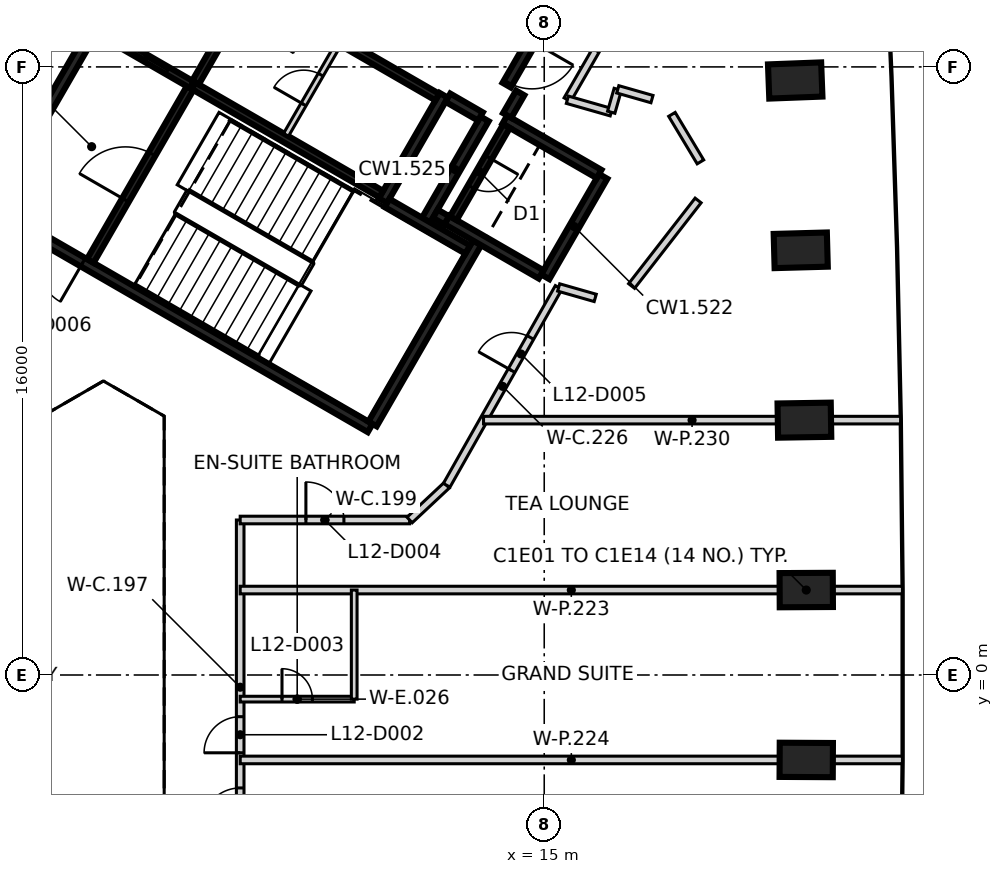
"""IFC4 building model, lengths in metres.
Left out: names, types, materials, properties, quantities, classifications, styles, units other than length and angle.
Written with IfcOpenShell. Run it as: python <this file> out.ifc"""

import sys

from ifc_helpers import new_model, si_unit, direction, frame, frame_2d, origin, origin_2d, place, context, subcontext, project, spatial, rectangle, extrude, element, fill, save


model = new_model("IFC4")
c1 = context("Model", 3, precision=1e-05, world=origin(), true_north=direction((0.0, 1.0)))
c2 = subcontext(c1, "Body", "Model", "MODEL_VIEW")
j1 = project(units=[si_unit("LENGTHUNIT", "METRE"), si_unit("PLANEANGLEUNIT", "RADIAN")], contexts=[c1])
p1 = place(None, origin())
s1 = spatial("IfcSite", under=j1, at=p1, CompositionType="ELEMENT")
p2 = place(p1, origin())
s2 = spatial("IfcBuilding", under=s1, at=p2, CompositionType="ELEMENT")
p3 = place(p2, frame((0.0, 0.0, 56.6)))
s3 = spatial("IfcBuildingStorey", under=s2, at=p3, CompositionType="ELEMENT", Elevation=56.6)
for number, where, z_axis, x_axis in (
    (1, (21.894, -2.235, -0.475), (0.0, 0.0, 1.0), (-1.0, 0.005, 0.0)),
    (2, (21.894, 2.235, -0.475), (0.0, 0.0, 1.0), (1.0, 0.005, 0.0)),
    (3, (21.846, 6.706, -0.475), (0.0, 0.0, 1.0), (1.0, 0.016, 0.0)),
    (4, (21.749, 11.174, -0.475), (0.0, 0.0, 1.0), (1.0, 0.027, 0.0)),
    (5, (21.604, 15.643, -0.475), (0.0, 0.0, 1.0), (0.999, 0.038, 0.0)),
):
    element("IfcColumn", number, at=place(p3, frame(where, z_axis=z_axis, x_axis=x_axis)), inside=s3, PredefinedType="COLUMN", context=c2, shape_type="SweptSolid", body=[
        extrude(rectangle(XDim=1.4, YDim=0.9, at=origin_2d()), origin(), (0.0, 0.0, 1.0), 3.6),
    ])
p4 = place(p3, frame((10.42, 6.498, 0.0), z_axis=(0.0, 0.0, 1.0), x_axis=(-0.866021906294, 0.500006057782, 0.0)))
e6 = element("IfcWall", 6, at=p4, inside=s3, PredefinedType="SHEAR", context=c2, shape_type="SweptSolid", body=[
    extrude(rectangle(XDim=11.55, YDim=0.25, at=frame_2d((5.775, 0.0))), origin(), (0.0, 0.0, 1.0), 3.125),
])
p5 = place(p4, frame((10.025, 0.0, 0.0)))
e7 = element("IfcOpeningElement", 7, at=p5, cuts=e6, PredefinedType="OPENING", context=c2, shape_type="SweptSolid", body=[
    extrude(rectangle(XDim=1.2, YDim=2.1, at=frame_2d((0.6, 1.05))), frame((0.0, 0.135, 0.0), z_axis=(0.0, -1.0, 0.0), x_axis=(1.0, 0.0, 0.0)), (0.0, 0.0, 1.0), 0.27),
])
p6 = place(p4, frame((8.725, 0.0, 0.0)))
e8 = element("IfcOpeningElement", 8, at=p6, cuts=e6, PredefinedType="OPENING", context=c2, shape_type="SweptSolid", body=[
    extrude(rectangle(XDim=1.2, YDim=2.1, at=frame_2d((0.6, 1.05))), frame((0.0, 0.135, 0.0), z_axis=(0.0, -1.0, 0.0), x_axis=(1.0, 0.0, 0.0)), (0.0, 0.0, 1.0), 0.27),
])
p7 = place(p3, frame((0.48, 12.381, 0.0), z_axis=(0.0, 0.0, 1.0), x_axis=(0.49999885962, 0.866026062182, 0.0)))
e9 = element("IfcWall", 9, at=p7, inside=s3, PredefinedType="SHEAR", context=c2, shape_type="SweptSolid", body=[
    extrude(rectangle(XDim=5.225, YDim=0.25, at=frame_2d((2.612, 0.0))), origin(), (0.0, 0.0, 1.0), 3.125),
])
p8 = place(p3, frame((13.238, 11.378, 0.0), z_axis=(0.0, 0.0, 1.0), x_axis=(-0.500008851346, -0.866020293397, 0.0)))
e10 = element("IfcWall", 10, at=p8, inside=s3, PredefinedType="SHEAR", context=c2, shape_type="SweptSolid", body=[
    extrude(rectangle(XDim=5.51, YDim=0.25, at=frame_2d((2.755, 0.0))), origin(), (0.0, 0.0, 1.0), 3.125),
])
p9 = place(p3, frame((12.357, 15.252, 0.0), z_axis=(0.0, 0.0, 1.0), x_axis=(-0.500028443584, -0.866008981251, 0.0)))
e11 = element("IfcWall", 11, at=p9, inside=s3, PredefinedType="SHEAR", context=c2, shape_type="SweptSolid", body=[
    extrude(rectangle(XDim=3.2, YDim=0.25, at=frame_2d((1.6, 0.0))), origin(), (0.0, 0.0, 1.0), 3.125),
])
p10 = place(p3, frame((16.552, 13.119, 0.0), z_axis=(0.0, 0.0, 1.0), x_axis=(-0.499978833458, -0.866037623948, 0.0)))
e12 = element("IfcWall", 12, at=p10, inside=s3, PredefinedType="SHEAR", context=c2, shape_type="SweptSolid", body=[
    extrude(rectangle(XDim=3.05, YDim=0.25, at=frame_2d((1.525, 0.0))), origin(), (0.0, 0.0, 1.0), 3.125),
])
p11 = place(p3, frame((14.918, 10.54, 0.0), z_axis=(0.0, 0.0, 1.0), x_axis=(-0.866063538972, 0.499933942099, 0.0)))
e13 = element("IfcWall", 13, at=p11, inside=s3, PredefinedType="SHEAR", context=c2, shape_type="SweptSolid", body=[
    extrude(rectangle(XDim=2.865, YDim=0.25, at=frame_2d((1.432, 0.0))), origin(), (0.0, 0.0, 1.0), 3.125),
])
p12 = place(p3, frame((13.963, 14.614, 0.0), z_axis=(0.0, 0.0, 1.0), x_axis=(0.866042235819, -0.499970844928, 0.0)))
e14 = element("IfcWall", 14, at=p12, inside=s3, PredefinedType="SHEAR", context=c2, shape_type="SweptSolid", body=[
    extrude(rectangle(XDim=2.865, YDim=0.25, at=frame_2d((1.432, 0.0))), origin(), (0.0, 0.0, 1.0), 3.125),
])
p13 = place(p3, frame((11.888, 11.961, 0.0), z_axis=(0.0, 0.0, 1.0), x_axis=(0.500003324108, 0.866023484601, 0.0)))
e15 = element("IfcWall", 15, at=p13, inside=s3, PredefinedType="SHEAR", context=c2, shape_type="SweptSolid", body=[
    extrude(rectangle(XDim=3.085, YDim=0.25, at=frame_2d((1.542, 0.0))), origin(), (0.0, 0.0, 1.0), 3.125),
])
p14 = place(p3, frame((10.865, 12.418, 0.0), z_axis=(0.0, 0.0, 1.0), x_axis=(0.866026229868, -0.499998569178, 0.0)))
e16 = element("IfcWall", 16, at=p14, inside=s3, PredefinedType="SHEAR", context=c2, shape_type="SweptSolid", body=[
    extrude(rectangle(XDim=2.449, YDim=0.25, at=frame_2d((1.225, 0.0))), origin(), (0.0, 0.0, 1.0), 3.125),
])
p15 = place(p3, frame((14.945, 17.135, 0.0), z_axis=(0.0, 0.0, 1.0), x_axis=(-0.499983108224, -0.866035156036, 0.0)))
e17 = element("IfcWall", 17, at=p15, inside=s3, PredefinedType="SHEAR", context=c2, shape_type="SweptSolid", body=[
    extrude(rectangle(XDim=1.865, YDim=0.25, at=frame_2d((0.932, 0.0))), origin(), (0.0, 0.0, 1.0), 3.125),
])
p16 = place(p15, frame((0.535, 0.0, 0.0)))
e18 = element("IfcOpeningElement", 18, at=p16, cuts=e17, PredefinedType="OPENING", context=c2, shape_type="SweptSolid", body=[
    extrude(rectangle(XDim=1.25, YDim=2.1, at=frame_2d((0.625, 1.05))), frame((0.0, 0.135, 0.0), z_axis=(0.0, -1.0, 0.0), x_axis=(1.0, 0.0, 0.0)), (0.0, 0.0, 1.0), 0.27),
])
p17 = place(p3, frame((13.322, 14.695, 0.0), z_axis=(0.0, 0.0, 1.0), x_axis=(-0.866017078145, 0.500014420154, 0.0)))
e19 = element("IfcWall", 19, at=p17, inside=s3, PredefinedType="SHEAR", context=c2, shape_type="SweptSolid", body=[
    extrude(rectangle(XDim=0.989, YDim=0.25, at=frame_2d((0.495, 0.0))), origin(), (0.0, 0.0, 1.0), 3.125),
])
p18 = place(p3, frame((14.368, 15.315, 0.0), z_axis=(0.0, 0.0, 1.0), x_axis=(-0.499897359611, -0.866084655132, 0.0)))
e20 = element("IfcWall", 20, at=p18, inside=s3, PredefinedType="SHEAR", context=c2, shape_type="SweptSolid", body=[
    extrude(rectangle(XDim=0.685, YDim=0.25, at=frame_2d((0.342, 0.0))), origin(), (0.0, 0.0, 1.0), 3.125),
])
p19 = place(p3, frame((12.433, 11.964, 0.0), z_axis=(0.0, 0.0, 1.0), x_axis=(-0.866055875208, 0.499947218231, 0.0)))
e21 = element("IfcWall", 21, at=p19, inside=s3, PredefinedType="SHEAR", context=c2, shape_type="SweptSolid", body=[
    extrude(rectangle(XDim=0.345, YDim=0.25, at=frame_2d((0.172, 0.0))), origin(), (0.0, 0.0, 1.0), 3.125),
])
p20 = place(p3, frame((5.775, 15.502, 0.0), z_axis=(0.0, 0.0, 1.0), x_axis=(0.866020080793, -0.500009219579, 0.0)))
e22 = element("IfcWall", 22, at=p20, inside=s3, PredefinedType="SHEAR", context=c2, shape_type="SweptSolid", body=[
    extrude(rectangle(XDim=5.699, YDim=0.2, at=frame_2d((2.85, 0.0))), origin(), (0.0, 0.0, 1.0), 3.125),
])
p21 = place(p3, frame((12.185, 15.207, 0.0), z_axis=(0.0, 0.0, 1.0), x_axis=(-0.866020080793, 0.500009219579, 0.0)))
e23 = element("IfcWall", 23, at=p21, inside=s3, PredefinedType="SHEAR", context=c2, shape_type="SweptSolid", body=[
    extrude(rectangle(XDim=5.699, YDim=0.2, at=frame_2d((2.85, 0.0))), origin(), (0.0, 0.0, 1.0), 3.125),
])
p22 = place(p21, frame((3.874, 0.0, 0.0)))
e24 = element("IfcOpeningElement", 24, at=p22, cuts=e23, PredefinedType="OPENING", context=c2, shape_type="SweptSolid", body=[
    extrude(rectangle(XDim=0.9, YDim=2.1, at=frame_2d((0.45, 1.05))), frame((0.0, 0.11, 0.0), z_axis=(0.0, -1.0, 0.0), x_axis=(1.0, 0.0, 0.0)), (0.0, 0.0, 1.0), 0.22),
])
p23 = place(p3, frame((3.057, 10.895, 0.0), z_axis=(0.0, 0.0, 1.0), x_axis=(0.499989418164, 0.866031513124, 0.0)))
e25 = element("IfcWall", 25, at=p23, inside=s3, PredefinedType="SHEAR", context=c2, shape_type="SweptSolid", body=[
    extrude(rectangle(XDim=5.251, YDim=0.2, at=frame_2d((2.625, 0.0))), origin(), (0.0, 0.0, 1.0), 3.125),
])
p24 = place(p23, frame((1.849, 0.0, 0.0)))
e26 = element("IfcOpeningElement", 26, at=p24, cuts=e25, PredefinedType="OPENING", context=c2, shape_type="SweptSolid", body=[
    extrude(rectangle(XDim=1.4, YDim=2.1, at=frame_2d((0.7, 1.05))), frame((0.0, 0.11, 0.0), z_axis=(0.0, -1.0, 0.0), x_axis=(1.0, 0.0, 0.0)), (0.0, 0.0, 1.0), 0.22),
])
p25 = place(p3, frame((14.008, 14.442, 0.0), z_axis=(0.0, 0.0, 1.0), x_axis=(-0.499986818241, -0.866033014143, 0.0)))
e27 = element("IfcWall", 27, at=p25, inside=s3, PredefinedType="SHEAR", context=c2, shape_type="SweptSolid", body=[
    extrude(rectangle(XDim=2.798, YDim=0.2, at=frame_2d((1.399, 0.0))), origin(), (0.0, 0.0, 1.0), 3.125),
])
p26 = place(p25, frame((0.949, 0.0, 0.0)))
e28 = element("IfcOpeningElement", 28, at=p26, cuts=e27, PredefinedType="OPENING", context=c2, shape_type="SweptSolid", body=[
    extrude(rectangle(XDim=0.9, YDim=2.1, at=frame_2d((0.45, 1.05))), frame((0.0, 0.11, 0.0), z_axis=(0.0, -1.0, 0.0), x_axis=(1.0, 0.0, 0.0)), (0.0, 0.0, 1.0), 0.22),
])
p27 = place(p3, frame((7.199, 17.97, 0.0), z_axis=(0.0, 0.0, 1.0), x_axis=(-0.499968400327, -0.866043647095, 0.0)))
e29 = element("IfcWall", 29, at=p27, inside=s3, PredefinedType="SHEAR", context=c2, shape_type="SweptSolid", body=[
    extrude(rectangle(XDim=2.75, YDim=0.2, at=frame_2d((1.375, 0.0))), origin(), (0.0, 0.0, 1.0), 3.125),
])
p28 = place(p3, frame((5.725, 15.531, 0.0), z_axis=(0.0, 0.0, 1.0), x_axis=(-0.866037306777, 0.499979382845, 0.0)))
e30 = element("IfcWall", 30, at=p28, inside=s3, PredefinedType="SHEAR", context=c2, shape_type="SweptSolid", body=[
    extrude(rectangle(XDim=2.742, YDim=0.2, at=frame_2d((1.371, 0.0))), origin(), (0.0, 0.0, 1.0), 3.125),
])
p29 = place(p28, frame((0.743, 0.0, 0.0)))
e31 = element("IfcOpeningElement", 31, at=p29, cuts=e30, PredefinedType="OPENING", context=c2, shape_type="SweptSolid", body=[
    extrude(rectangle(XDim=1.3, YDim=2.1, at=frame_2d((0.65, 1.05))), frame((0.0, 0.11, 0.0), z_axis=(0.0, -1.0, 0.0), x_axis=(1.0, 0.0, 0.0)), (0.0, 0.0, 1.0), 0.22),
])
p30 = place(p3, frame((8.207, 14.214, 0.0), z_axis=(0.0, 0.0, 1.0), x_axis=(0.499922376475, 0.866070215109, 0.0)))
e32 = element("IfcWall", 32, at=p30, inside=s3, PredefinedType="PARTITIONING", context=c2, shape_type="SweptSolid", body=[
    extrude(rectangle(XDim=2.749, YDim=0.15, at=frame_2d((1.374, 0.0))), origin(), (0.0, 0.0, 1.0), 3.125),
])
p31 = place(p30, frame((0.924, 0.0, 0.0)))
e33 = element("IfcOpeningElement", 33, at=p31, cuts=e32, PredefinedType="OPENING", context=c2, shape_type="SweptSolid", body=[
    extrude(rectangle(XDim=0.9, YDim=2.1, at=frame_2d((0.45, 1.05))), frame((0.0, 0.085, 0.0), z_axis=(0.0, -1.0, 0.0), x_axis=(1.0, 0.0, 0.0)), (0.0, 0.0, 1.0), 0.17),
])
p32 = place(p3, frame((7.0, -4.721, 0.0), z_axis=(0.0, 0.0, 1.0), x_axis=(0.0, 1.0, 0.0)))
e34 = element("IfcWall", 34, at=p32, inside=s3, PredefinedType="PARTITIONING", context=c2, shape_type="SweptSolid", body=[
    extrude(rectangle(XDim=8.799, YDim=0.2, at=frame_2d((4.399, 0.0))), origin(), (0.0, 0.0, 1.0), 3.125),
])
p33 = place(p32, frame((0.749, 0.0, 0.0)))
e35 = element("IfcOpeningElement", 35, at=p33, cuts=e34, PredefinedType="OPENING", context=c2, shape_type="SweptSolid", body=[
    extrude(rectangle(XDim=1.0, YDim=2.1, at=frame_2d((0.5, 1.05))), frame((0.0, 0.11, 0.0), z_axis=(0.0, -1.0, 0.0), x_axis=(1.0, 0.0, 0.0)), (0.0, 0.0, 1.0), 0.22),
])
p34 = place(p32, frame((2.674, 0.0, 0.0)))
e36 = element("IfcOpeningElement", 36, at=p34, cuts=e34, PredefinedType="OPENING", context=c2, shape_type="SweptSolid", body=[
    extrude(rectangle(XDim=0.95, YDim=2.1, at=frame_2d((0.475, 1.05))), frame((0.0, 0.11, 0.0), z_axis=(0.0, -1.0, 0.0), x_axis=(1.0, 0.0, 0.0)), (0.0, 0.0, 1.0), 0.22),
])
p35 = place(p3, frame((7.0, 4.078, 0.0), z_axis=(0.0, 0.0, 1.0), x_axis=(1.0, 0.0, 0.0)))
e37 = element("IfcWall", 37, at=p35, inside=s3, PredefinedType="PARTITIONING", context=c2, shape_type="SweptSolid", body=[
    extrude(rectangle(XDim=4.458, YDim=0.2, at=frame_2d((2.229, 0.0))), origin(), (0.0, 0.0, 1.0), 3.125),
])
p36 = place(p35, frame((1.729, 0.0, 0.0)))
e38 = element("IfcOpeningElement", 38, at=p36, cuts=e37, PredefinedType="OPENING", context=c2, shape_type="SweptSolid", body=[
    extrude(rectangle(XDim=1.0, YDim=2.1, at=frame_2d((0.5, 1.05))), frame((0.0, 0.11, 0.0), z_axis=(0.0, -1.0, 0.0), x_axis=(1.0, 0.0, 0.0)), (0.0, 0.0, 1.0), 0.22),
])
p37 = place(p3, frame((11.458, 4.078, 0.0), z_axis=(0.0, 0.0, 1.0), x_axis=(0.729936032318, 0.683515463412, 0.0)))
e39 = element("IfcWall", 39, at=p37, inside=s3, PredefinedType="PARTITIONING", context=c2, shape_type="SweptSolid", body=[
    extrude(rectangle(XDim=1.336, YDim=0.2, at=frame_2d((0.668, 0.0))), origin(), (0.0, 0.0, 1.0), 3.125),
])
p38 = place(p3, frame((12.433, 4.992, 0.0), z_axis=(0.0, 0.0, 1.0), x_axis=(0.492583054982, 0.870265438786, 0.0)))
e40 = element("IfcWall", 40, at=p38, inside=s3, PredefinedType="PARTITIONING", context=c2, shape_type="SweptSolid", body=[
    extrude(rectangle(XDim=5.981, YDim=0.2, at=frame_2d((2.991, 0.0))), origin(), (0.0, 0.0, 1.0), 3.125),
])
p39 = place(p38, frame((3.469, 0.0, 0.0)))
e41 = element("IfcOpeningElement", 41, at=p39, cuts=e40, PredefinedType="OPENING", context=c2, shape_type="SweptSolid", body=[
    extrude(rectangle(XDim=1.0, YDim=2.1, at=frame_2d((0.5, 1.05))), frame((0.0, 0.11, 0.0), z_axis=(0.0, -1.0, 0.0), x_axis=(1.0, 0.0, 0.0)), (0.0, 0.0, 1.0), 0.22),
])
p40 = place(p3, frame((15.156, 17.13, 0.0), z_axis=(0.0, 0.0, 1.0), x_axis=(0.865755062894, -0.500467952093, 0.0)))
e42 = element("IfcWall", 42, at=p40, inside=s3, PredefinedType="PARTITIONING", context=c2, shape_type="SweptSolid", body=[
    extrude(rectangle(XDim=1.389, YDim=0.2, at=frame_2d((0.694, 0.0))), origin(), (0.0, 0.0, 1.0), 3.125),
])
p41 = place(p3, frame((15.38, 10.197, 0.0), z_axis=(0.0, 0.0, 1.0), x_axis=(0.961523947641, -0.274721127897, 0.0)))
e43 = element("IfcWall", 43, at=p41, inside=s3, PredefinedType="PARTITIONING", context=c2, shape_type="SweptSolid", body=[
    extrude(rectangle(XDim=1.001, YDim=0.2, at=frame_2d((0.5, 0.0))), origin(), (0.0, 0.0, 1.0), 3.125),
])
p42 = place(p3, frame((15.609, 15.136, 0.0), z_axis=(0.0, 0.0, 1.0), x_axis=(0.499501622561, 0.866312950993, 0.0)))
e44 = element("IfcWall", 44, at=p42, inside=s3, PredefinedType="PARTITIONING", context=c2, shape_type="SweptSolid", body=[
    extrude(rectangle(XDim=1.5, YDim=0.2, at=frame_2d((0.75, 0.0))), origin(), (0.0, 0.0, 1.0), 3.125),
])
p43 = place(p3, frame((15.609, 15.136, 0.0), z_axis=(0.0, 0.0, 1.0), x_axis=(0.961662011825, -0.274237442763, 0.0)))
e45 = element("IfcWall", 45, at=p43, inside=s3, PredefinedType="PARTITIONING", context=c2, shape_type="SweptSolid", body=[
    extrude(rectangle(XDim=1.2, YDim=0.2, at=frame_2d((0.6, 0.0))), origin(), (0.0, 0.0, 1.0), 3.125),
])
p44 = place(p3, frame((16.763, 14.807, 0.0), z_axis=(0.0, 0.0, 1.0), x_axis=(0.274464026122, 0.961597368115, 0.0)))
e46 = element("IfcWall", 46, at=p44, inside=s3, PredefinedType="PARTITIONING", context=c2, shape_type="SweptSolid", body=[
    extrude(rectangle(XDim=0.627, YDim=0.2, at=frame_2d((0.313, 0.0))), origin(), (0.0, 0.0, 1.0), 3.125),
])
p45 = place(p3, frame((16.935, 15.41, 0.0), z_axis=(0.0, 0.0, 1.0), x_axis=(0.961602664273, -0.274445470107, 0.0)))
e47 = element("IfcWall", 47, at=p45, inside=s3, PredefinedType="PARTITIONING", context=c2, shape_type="SweptSolid", body=[
    extrude(rectangle(XDim=0.936, YDim=0.2, at=frame_2d((0.468, 0.0))), origin(), (0.0, 0.0, 1.0), 3.125),
])
p46 = place(p3, frame((17.299, 10.235, 0.0), z_axis=(0.0, 0.0, 1.0), x_axis=(0.61377461522, 0.789481299153, 0.0)))
e48 = element("IfcWall", 48, at=p46, inside=s3, PredefinedType="PARTITIONING", context=c2, shape_type="SweptSolid", body=[
    extrude(rectangle(XDim=2.851, YDim=0.2, at=frame_2d((1.426, 0.0))), origin(), (0.0, 0.0, 1.0), 3.125),
])
p47 = place(p3, frame((18.36, 14.751, 0.0), z_axis=(0.0, 0.0, 1.0), x_axis=(0.514495755428, -0.857492925713, 0.0)))
e49 = element("IfcWall", 49, at=p47, inside=s3, PredefinedType="PARTITIONING", context=c2, shape_type="SweptSolid", body=[
    extrude(rectangle(XDim=1.458, YDim=0.2, at=frame_2d((0.729, 0.0))), origin(), (0.0, 0.0, 1.0), 3.125),
])
p48 = place(p3, frame((7.0, 2.235, 0.0), z_axis=(0.0, 0.0, 1.0), x_axis=(1.0, 0.0, 0.0)))
e50 = element("IfcWall", 50, at=p48, inside=s3, PredefinedType="PARTITIONING", context=c2, shape_type="SweptSolid", body=[
    extrude(rectangle(XDim=17.425, YDim=0.2, at=frame_2d((8.712, 0.0))), origin(), (0.0, 0.0, 1.0), 3.125),
])
p49 = place(p3, frame((7.001, -2.235, 0.0), z_axis=(0.0, 0.0, 1.0), x_axis=(1.0, 0.0, 0.0)))
e51 = element("IfcWall", 51, at=p49, inside=s3, PredefinedType="PARTITIONING", context=c2, shape_type="SweptSolid", body=[
    extrude(rectangle(XDim=17.424, YDim=0.2, at=frame_2d((8.712, 0.0))), origin(), (0.0, 0.0, 1.0), 3.125),
])
p50 = place(p3, frame((13.403, 6.706, 0.0), z_axis=(0.0, 0.0, 1.0), x_axis=(1.0, 0.0, 0.0)))
e52 = element("IfcWall", 52, at=p50, inside=s3, PredefinedType="PARTITIONING", context=c2, shape_type="SweptSolid", body=[
    extrude(rectangle(XDim=10.974, YDim=0.2, at=frame_2d((5.487, 0.0))), origin(), (0.0, 0.0, 1.0), 3.125),
])
p51 = place(p3, frame((7.0, -0.635, 0.0), z_axis=(0.0, 0.0, 1.0), x_axis=(1.0, 0.0, 0.0)))
e53 = element("IfcWall", 53, at=p51, inside=s3, PredefinedType="PARTITIONING", context=c2, shape_type="SweptSolid", body=[
    extrude(rectangle(XDim=3.0, YDim=0.15, at=frame_2d((1.5, 0.0))), origin(), (0.0, 0.0, 1.0), 3.125),
])
p52 = place(p51, frame((1.1, 0.0, 0.0)))
e54 = element("IfcOpeningElement", 54, at=p52, cuts=e53, PredefinedType="OPENING", context=c2, shape_type="SweptSolid", body=[
    extrude(rectangle(XDim=0.8, YDim=2.1, at=frame_2d((0.4, 1.05))), frame((0.0, 0.085, 0.0), z_axis=(0.0, -1.0, 0.0), x_axis=(1.0, 0.0, 0.0)), (0.0, 0.0, 1.0), 0.17),
])
p53 = place(p3, frame((10.0, -0.635, 0.0), z_axis=(0.0, 0.0, 1.0), x_axis=(0.0, 1.0, 0.0)))
e55 = element("IfcWall", 55, at=p53, inside=s3, PredefinedType="PARTITIONING", context=c2, shape_type="SweptSolid", body=[
    extrude(rectangle(XDim=2.87, YDim=0.15, at=frame_2d((1.435, 0.0))), origin(), (0.0, 0.0, 1.0), 3.125),
])
p54 = place(p29, origin())
e56 = element("IfcDoor", 56, at=p54, inside=s3, OperationType="SLIDING_TO_RIGHT", PredefinedType="DOOR", context=c2, shape_type="SweptSolid", body=[
    extrude(rectangle(XDim=1.3, YDim=2.1, at=frame_2d((0.65, 1.05))), frame((0.0, 0.025, 0.0), z_axis=(0.0, -1.0, 0.0), x_axis=(1.0, 0.0, 0.0)), (0.0, 0.0, 1.0), 0.05),
])
fill(e31, e56)
p55 = place(p16, origin())
e57 = element("IfcDoor", 57, at=p55, inside=s3, OperationType="SINGLE_SWING_LEFT", PredefinedType="DOOR", context=c2, shape_type="SweptSolid", body=[
    extrude(rectangle(XDim=1.25, YDim=2.1, at=frame_2d((0.625, 1.05))), frame((0.0, 0.025, 0.0), z_axis=(0.0, -1.0, 0.0), x_axis=(1.0, 0.0, 0.0)), (0.0, 0.0, 1.0), 0.05),
])
fill(e18, e57)
p56 = place(p6, origin())
e58 = element("IfcDoor", 58, at=p56, inside=s3, OperationType="SINGLE_SWING_RIGHT", PredefinedType="DOOR", context=c2, shape_type="SweptSolid", body=[
    extrude(rectangle(XDim=1.2, YDim=2.1, at=frame_2d((0.6, 1.05))), frame((0.0, 0.025, 0.0), z_axis=(0.0, -1.0, 0.0), x_axis=(1.0, 0.0, 0.0)), (0.0, 0.0, 1.0), 0.05),
])
fill(e8, e58)
p57 = place(p24, origin())
e59 = element("IfcDoor", 59, at=p57, inside=s3, OperationType="SINGLE_SWING_RIGHT", PredefinedType="DOOR", context=c2, shape_type="SweptSolid", body=[
    extrude(rectangle(XDim=1.4, YDim=2.1, at=frame_2d((0.7, 1.05))), frame((0.0, 0.025, 0.0), z_axis=(0.0, -1.0, 0.0), x_axis=(1.0, 0.0, 0.0)), (0.0, 0.0, 1.0), 0.05),
])
fill(e26, e59)
p58 = place(p26, origin())
e60 = element("IfcDoor", 60, at=p58, inside=s3, OperationType="SINGLE_SWING_RIGHT", PredefinedType="DOOR", context=c2, shape_type="SweptSolid", body=[
    extrude(rectangle(XDim=0.9, YDim=2.1, at=frame_2d((0.45, 1.05))), frame((0.0, 0.025, 0.0), z_axis=(0.0, -1.0, 0.0), x_axis=(1.0, 0.0, 0.0)), (0.0, 0.0, 1.0), 0.05),
])
fill(e28, e60)
p59 = place(p31, origin())
e61 = element("IfcDoor", 61, at=p59, inside=s3, OperationType="SINGLE_SWING_LEFT", PredefinedType="DOOR", context=c2, shape_type="SweptSolid", body=[
    extrude(rectangle(XDim=0.9, YDim=2.1, at=frame_2d((0.45, 1.05))), frame((0.0, 0.025, 0.0), z_axis=(0.0, -1.0, 0.0), x_axis=(1.0, 0.0, 0.0)), (0.0, 0.0, 1.0), 0.05),
])
fill(e33, e61)
p60 = place(p33, frame((1.0, 0.0, 0.0), z_axis=(0.0, 0.0, 1.0), x_axis=(-1.0, 0.0, 0.0)))
e62 = element("IfcDoor", 62, at=p60, inside=s3, OperationType="SINGLE_SWING_LEFT", PredefinedType="DOOR", context=c2, shape_type="SweptSolid", body=[
    extrude(rectangle(XDim=1.0, YDim=2.1, at=frame_2d((0.5, 1.05))), frame((0.0, 0.025, 0.0), z_axis=(0.0, -1.0, 0.0), x_axis=(1.0, 0.0, 0.0)), (0.0, 0.0, 1.0), 0.05),
])
fill(e35, e62)
p61 = place(p34, frame((0.95, 0.0, 0.0), z_axis=(0.0, 0.0, 1.0), x_axis=(-1.0, 0.0, 0.0)))
e63 = element("IfcDoor", 63, at=p61, inside=s3, OperationType="SINGLE_SWING_LEFT", PredefinedType="DOOR", context=c2, shape_type="SweptSolid", body=[
    extrude(rectangle(XDim=0.95, YDim=2.1, at=frame_2d((0.475, 1.05))), frame((0.0, 0.025, 0.0), z_axis=(0.0, -1.0, 0.0), x_axis=(1.0, 0.0, 0.0)), (0.0, 0.0, 1.0), 0.05),
])
fill(e36, e63)
p62 = place(p52, origin())
e64 = element("IfcDoor", 64, at=p62, inside=s3, OperationType="SINGLE_SWING_LEFT", PredefinedType="DOOR", context=c2, shape_type="SweptSolid", body=[
    extrude(rectangle(XDim=0.8, YDim=2.1, at=frame_2d((0.4, 1.05))), frame((0.0, 0.025, 0.0), z_axis=(0.0, -1.0, 0.0), x_axis=(1.0, 0.0, 0.0)), (0.0, 0.0, 1.0), 0.05),
])
fill(e54, e64)
p63 = place(p36, origin())
e65 = element("IfcDoor", 65, at=p63, inside=s3, OperationType="SINGLE_SWING_LEFT", PredefinedType="DOOR", context=c2, shape_type="SweptSolid", body=[
    extrude(rectangle(XDim=1.0, YDim=2.1, at=frame_2d((0.5, 1.05))), frame((0.0, 0.025, 0.0), z_axis=(0.0, -1.0, 0.0), x_axis=(1.0, 0.0, 0.0)), (0.0, 0.0, 1.0), 0.05),
])
fill(e38, e65)
p64 = place(p39, origin())
e66 = element("IfcDoor", 66, at=p64, inside=s3, OperationType="SINGLE_SWING_LEFT", PredefinedType="DOOR", context=c2, shape_type="SweptSolid", body=[
    extrude(rectangle(XDim=1.0, YDim=2.1, at=frame_2d((0.5, 1.05))), frame((0.0, 0.025, 0.0), z_axis=(0.0, -1.0, 0.0), x_axis=(1.0, 0.0, 0.0)), (0.0, 0.0, 1.0), 0.05),
])
fill(e41, e66)
save(model, sys.argv[1])
